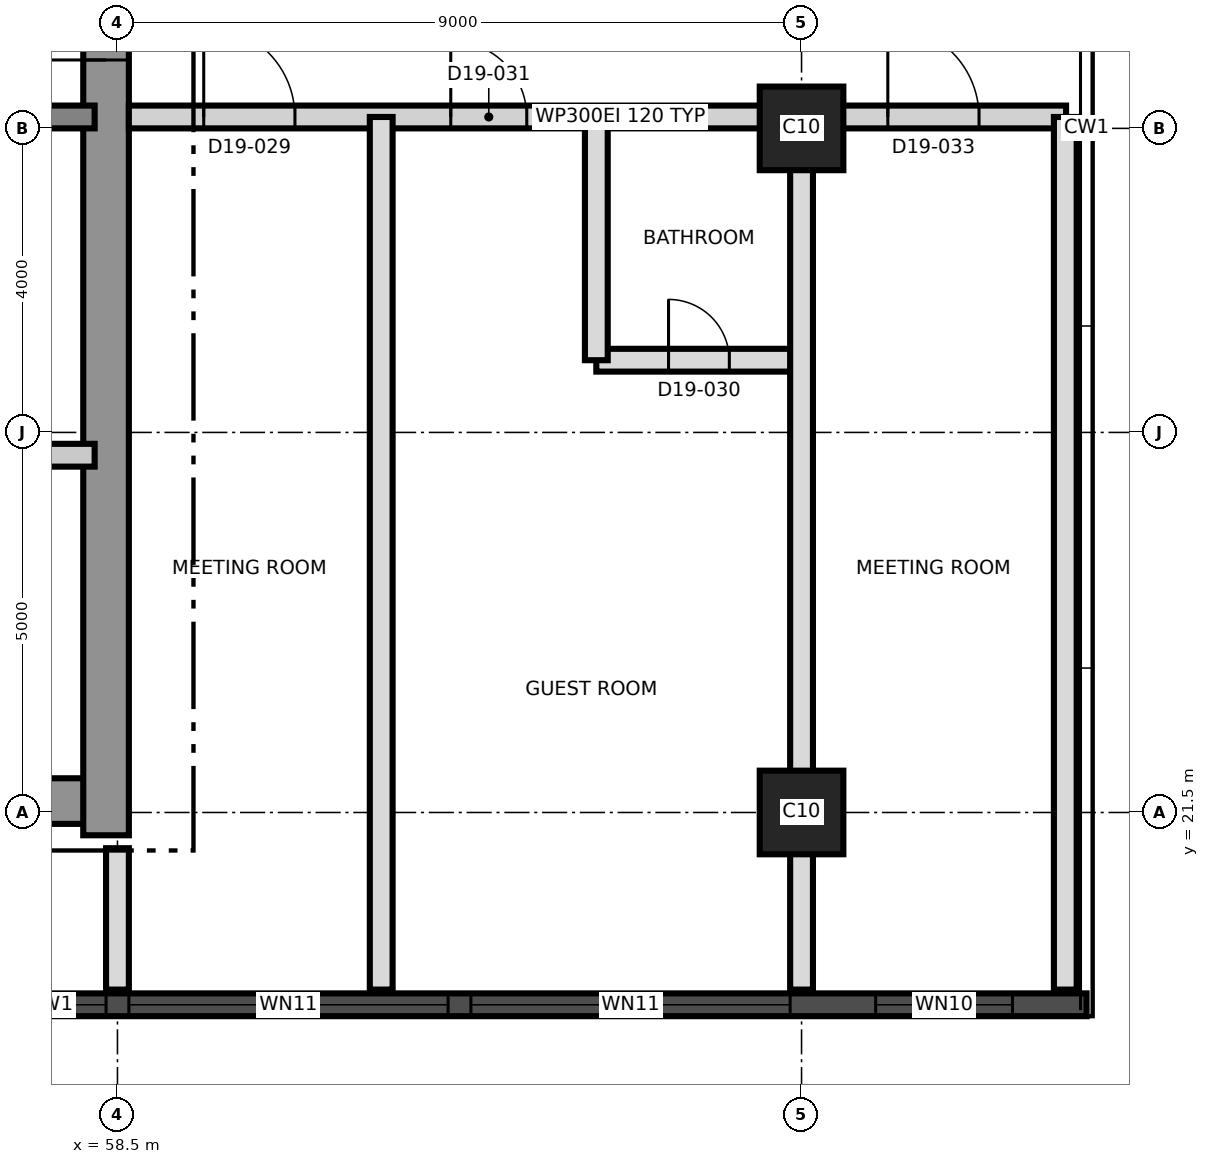
"""IFC4 building model, lengths in metres.
Left out: names, types, materials, properties, quantities, classifications, styles, units other than length and angle.
Written with IfcOpenShell. Run it as: python <this file> out.ifc"""

import sys

from ifc_helpers import new_model, si_unit, direction, frame, frame_2d, origin, origin_2d, place, context, subcontext, project, spatial, rectangle, extrude, element, fill, save


model = new_model("IFC4")
c1 = context("Model", 3, precision=1e-05, world=origin(), true_north=direction((0.0, 1.0)))
c2 = subcontext(c1, "Body", "Model", "MODEL_VIEW")
j1 = project(units=[si_unit("LENGTHUNIT", "METRE"), si_unit("PLANEANGLEUNIT", "RADIAN")], contexts=[c1])
p1 = place(None, origin())
s1 = spatial("IfcSite", under=j1, at=p1, CompositionType="ELEMENT")
p2 = place(p1, origin())
s2 = spatial("IfcBuilding", under=s1, at=p2, CompositionType="ELEMENT")
p3 = place(p2, frame((0.0, 0.0, 179.2)))
s3 = spatial("IfcBuildingStorey", under=s2, at=p3, CompositionType="ELEMENT", Elevation=179.2)
p4 = place(p3, frame((31.2, 21.65, 0.0), z_axis=(0.0, 0.0, 1.0), x_axis=(1.0, 0.0, 0.0)))
e1 = element("IfcWall", 1, at=p4, inside=s3, PredefinedType="SHEAR", context=c2, shape_type="SweptSolid", body=[
    extrude(rectangle(XDim=27.0, YDim=0.6, at=frame_2d((13.5, 0.0))), origin(), (0.0, 0.0, 1.0), 3.7),
])
p5 = place(p3, frame((58.35, 21.2, 0.0), z_axis=(0.0, 0.0, 1.0), x_axis=(0.0, 1.0, 0.0)))
e2 = element("IfcWall", 2, at=p5, inside=s3, PredefinedType="SHEAR", context=c2, shape_type="SweptSolid", body=[
    extrude(rectangle(XDim=18.6, YDim=0.6, at=frame_2d((9.3, 0.0))), origin(), (0.0, 0.0, 1.0), 3.7),
])
p6 = place(p5, frame((10.2, 0.0, 0.0)))
e3 = element("IfcOpeningElement", 3, at=p6, cuts=e2, PredefinedType="OPENING", context=c2, shape_type="SweptSolid", body=[
    extrude(rectangle(XDim=1.2, YDim=2.1, at=frame_2d((0.6, 1.05))), frame((0.0, 0.31, 0.0), z_axis=(0.0, -1.0, 0.0), x_axis=(1.0, 0.0, 0.0)), (0.0, 0.0, 1.0), 0.62),
])
p7 = place(p3, frame((31.8, 30.65, 0.0), z_axis=(0.0, 0.0, 1.0), x_axis=(1.0, 0.0, 0.0)))
e4 = element("IfcWall", 4, at=p7, inside=s3, PredefinedType="SHEAR", context=c2, shape_type="SweptSolid", body=[
    extrude(rectangle(XDim=26.4, YDim=0.3, at=frame_2d((13.2, 0.0))), origin(), (0.0, 0.0, 1.0), 3.7),
])
p8 = place(p7, frame((24.7, 0.0, 0.0)))
e5 = element("IfcOpeningElement", 5, at=p8, cuts=e4, PredefinedType="OPENING", context=c2, shape_type="SweptSolid", body=[
    extrude(rectangle(XDim=1.0, YDim=2.1, at=frame_2d((0.5, 1.05))), frame((0.0, 0.16, 0.0), z_axis=(0.0, -1.0, 0.0), x_axis=(1.0, 0.0, 0.0)), (0.0, 0.0, 1.0), 0.32),
])
p9 = place(p7, frame((4.0, 0.0, 0.0)))
e6 = element("IfcOpeningElement", 6, at=p9, cuts=e4, PredefinedType="OPENING", context=c2, shape_type="SweptSolid", body=[
    extrude(rectangle(XDim=1.0, YDim=2.1, at=frame_2d((0.5, 1.05))), frame((0.0, 0.16, 0.0), z_axis=(0.0, -1.0, 0.0), x_axis=(1.0, 0.0, 0.0)), (0.0, 0.0, 1.0), 0.32),
])
for number, where, z_axis, x_axis in (
    (7, (67.5, 21.5, 0.0), (0.0, 0.0, 1.0), (1.0, 0.0, 0.0)),
    (8, (67.5, 30.5, 0.0), (0.0, 0.0, 1.0), (1.0, 0.0, 0.0)),
):
    element("IfcColumn", number, at=place(p3, frame(where, z_axis=z_axis, x_axis=x_axis)), inside=s3, PredefinedType="COLUMN", context=c2, shape_type="SweptSolid", body=[
        extrude(rectangle(XDim=1.1, YDim=1.1, at=origin_2d()), origin(), (0.0, 0.0, 1.0), 3.7),
    ])
p10 = place(p3, frame((44.01, 18.97, 0.0), z_axis=(0.0, 0.0, 1.0), x_axis=(1.0, 0.0, 0.0)))
e9 = element("IfcWall", 9, at=p10, inside=s3, PredefinedType="SOLIDWALL", context=c2, shape_type="SweptSolid", body=[
    extrude(rectangle(XDim=27.24, YDim=0.3, at=frame_2d((13.62, 0.0))), origin(), (0.0, 0.0, 1.0), 3.4),
])
p11 = place(p10, frame((1.845, 0.0, 0.3)))
e10 = element("IfcOpeningElement", 10, at=p11, cuts=e9, PredefinedType="OPENING", context=c2, shape_type="SweptSolid", body=[
    extrude(rectangle(XDim=1.8, YDim=2.4, at=frame_2d((0.9, 1.2))), frame((0.0, 0.16, 0.0), z_axis=(0.0, -1.0, 0.0), x_axis=(1.0, 0.0, 0.0)), (0.0, 0.0, 1.0), 0.32),
])
p12 = place(p10, frame((5.64, 0.0, 0.9)))
e11 = element("IfcOpeningElement", 11, at=p12, cuts=e9, PredefinedType="OPENING", context=c2, shape_type="SweptSolid", body=[
    extrude(rectangle(XDim=4.2, YDim=1.5, at=frame_2d((2.1, 0.75))), frame((0.0, 0.16, 0.0), z_axis=(0.0, -1.0, 0.0), x_axis=(1.0, 0.0, 0.0)), (0.0, 0.0, 1.0), 0.32),
])
p13 = place(p10, frame((10.14, 0.0, 0.9)))
e12 = element("IfcOpeningElement", 12, at=p13, cuts=e9, PredefinedType="OPENING", context=c2, shape_type="SweptSolid", body=[
    extrude(rectangle(XDim=4.2, YDim=1.5, at=frame_2d((2.1, 0.75))), frame((0.0, 0.16, 0.0), z_axis=(0.0, -1.0, 0.0), x_axis=(1.0, 0.0, 0.0)), (0.0, 0.0, 1.0), 0.32),
])
p14 = place(p10, frame((14.64, 0.0, 0.9)))
e13 = element("IfcOpeningElement", 13, at=p14, cuts=e9, PredefinedType="OPENING", context=c2, shape_type="SweptSolid", body=[
    extrude(rectangle(XDim=4.2, YDim=1.5, at=frame_2d((2.1, 0.75))), frame((0.0, 0.16, 0.0), z_axis=(0.0, -1.0, 0.0), x_axis=(1.0, 0.0, 0.0)), (0.0, 0.0, 1.0), 0.32),
])
p15 = place(p10, frame((19.14, 0.0, 0.9)))
e14 = element("IfcOpeningElement", 14, at=p15, cuts=e9, PredefinedType="OPENING", context=c2, shape_type="SweptSolid", body=[
    extrude(rectangle(XDim=4.2, YDim=1.5, at=frame_2d((2.1, 0.75))), frame((0.0, 0.16, 0.0), z_axis=(0.0, -1.0, 0.0), x_axis=(1.0, 0.0, 0.0)), (0.0, 0.0, 1.0), 0.32),
])
p16 = place(p10, frame((24.465, 0.0, 0.3)))
e15 = element("IfcOpeningElement", 15, at=p16, cuts=e9, PredefinedType="OPENING", context=c2, shape_type="SweptSolid", body=[
    extrude(rectangle(XDim=1.8, YDim=2.4, at=frame_2d((0.9, 1.2))), frame((0.0, 0.16, 0.0), z_axis=(0.0, -1.0, 0.0), x_axis=(1.0, 0.0, 0.0)), (0.0, 0.0, 1.0), 0.32),
])
p17 = place(p3, frame((55.8, 26.2, 0.0), z_axis=(0.0, 0.0, 1.0), x_axis=(1.0, 0.0, 0.0)))
e16 = element("IfcWall", 16, at=p17, inside=s3, PredefinedType="PARTITIONING", context=c2, shape_type="SweptSolid", body=[
    extrude(rectangle(XDim=2.4, YDim=0.3, at=frame_2d((1.2, 0.0))), origin(), (0.0, 0.0, 1.0), 3.4),
])
p18 = place(p17, frame((0.75, 0.0, 0.0)))
e17 = element("IfcOpeningElement", 17, at=p18, cuts=e16, PredefinedType="OPENING", context=c2, shape_type="SweptSolid", body=[
    extrude(rectangle(XDim=0.9, YDim=2.1, at=frame_2d((0.45, 1.05))), frame((0.0, 0.16, 0.0), z_axis=(0.0, -1.0, 0.0), x_axis=(1.0, 0.0, 0.0)), (0.0, 0.0, 1.0), 0.32),
])
p19 = place(p3, frame((64.8, 27.45, 0.0), z_axis=(0.0, 0.0, 1.0), x_axis=(1.0, 0.0, 0.0)))
e18 = element("IfcWall", 18, at=p19, inside=s3, PredefinedType="PARTITIONING", context=c2, shape_type="SweptSolid", body=[
    extrude(rectangle(XDim=2.7, YDim=0.3, at=frame_2d((1.35, 0.0))), origin(), (0.0, 0.0, 1.0), 3.4),
])
p20 = place(p19, frame((0.95, 0.0, 0.0)))
e19 = element("IfcOpeningElement", 19, at=p20, cuts=e18, PredefinedType="OPENING", context=c2, shape_type="SweptSolid", body=[
    extrude(rectangle(XDim=0.8, YDim=2.1, at=frame_2d((0.4, 1.05))), frame((0.0, 0.16, 0.0), z_axis=(0.0, -1.0, 0.0), x_axis=(1.0, 0.0, 0.0)), (0.0, 0.0, 1.0), 0.32),
])
p21 = place(p3, frame((58.65, 30.65, 0.0), z_axis=(0.0, 0.0, 1.0), x_axis=(1.0, 0.0, 0.0)))
e20 = element("IfcWall", 20, at=p21, inside=s3, PredefinedType="PARTITIONING", context=c2, shape_type="SweptSolid", body=[
    extrude(rectangle(XDim=12.33, YDim=0.3, at=frame_2d((6.165, 0.0))), origin(), (0.0, 0.0, 1.0), 3.4),
])
p22 = place(p21, frame((0.985, 0.0, 0.0)))
e21 = element("IfcOpeningElement", 21, at=p22, cuts=e20, PredefinedType="OPENING", context=c2, shape_type="SweptSolid", body=[
    extrude(rectangle(XDim=1.2, YDim=2.1, at=frame_2d((0.6, 1.05))), frame((0.0, 0.16, 0.0), z_axis=(0.0, -1.0, 0.0), x_axis=(1.0, 0.0, 0.0)), (0.0, 0.0, 1.0), 0.32),
])
p23 = place(p21, frame((4.235, 0.0, 0.0)))
e22 = element("IfcOpeningElement", 22, at=p23, cuts=e20, PredefinedType="OPENING", context=c2, shape_type="SweptSolid", body=[
    extrude(rectangle(XDim=1.0, YDim=2.1, at=frame_2d((0.5, 1.05))), frame((0.0, 0.16, 0.0), z_axis=(0.0, -1.0, 0.0), x_axis=(1.0, 0.0, 0.0)), (0.0, 0.0, 1.0), 0.32),
])
p24 = place(p21, frame((9.985, 0.0, 0.0)))
e23 = element("IfcOpeningElement", 23, at=p24, cuts=e20, PredefinedType="OPENING", context=c2, shape_type="SweptSolid", body=[
    extrude(rectangle(XDim=1.2, YDim=2.1, at=frame_2d((0.6, 1.05))), frame((0.0, 0.16, 0.0), z_axis=(0.0, -1.0, 0.0), x_axis=(1.0, 0.0, 0.0)), (0.0, 0.0, 1.0), 0.32),
])
p25 = place(p3, frame((58.5, 19.17, 0.0), z_axis=(0.0, 0.0, 1.0), x_axis=(0.0, 1.0, 0.0)))
e24 = element("IfcWall", 24, at=p25, inside=s3, PredefinedType="PARTITIONING", context=c2, shape_type="SweptSolid", body=[
    extrude(rectangle(XDim=1.86, YDim=0.3, at=frame_2d((0.93, 0.0))), origin(), (0.0, 0.0, 1.0), 3.4),
])
p26 = place(p3, frame((61.97, 19.17, 0.0), z_axis=(0.0, 0.0, 1.0), x_axis=(0.0, 1.0, 0.0)))
e25 = element("IfcWall", 25, at=p26, inside=s3, PredefinedType="PARTITIONING", context=c2, shape_type="SweptSolid", body=[
    extrude(rectangle(XDim=11.48, YDim=0.3, at=frame_2d((5.74, 0.0))), origin(), (0.0, 0.0, 1.0), 3.4),
])
p27 = place(p3, frame((64.8, 27.45, 0.0), z_axis=(0.0, 0.0, 1.0), x_axis=(0.0, 1.0, 0.0)))
e26 = element("IfcWall", 26, at=p27, inside=s3, PredefinedType="PARTITIONING", context=c2, shape_type="SweptSolid", body=[
    extrude(rectangle(XDim=3.2, YDim=0.3, at=frame_2d((1.6, 0.0))), origin(), (0.0, 0.0, 1.0), 3.4),
])
for number, where, z_axis, x_axis in (
    (27, (67.5, 19.17, 0.0), (0.0, 0.0, 1.0), (0.0, 1.0, 0.0)),
    (28, (70.97, 19.17, 0.0), (0.0, 0.0, 1.0), (0.0, 1.0, 0.0)),
):
    element("IfcWall", number, at=place(p3, frame(where, z_axis=z_axis, x_axis=x_axis)), inside=s3, PredefinedType="PARTITIONING", context=c2, shape_type="SweptSolid", body=[
        extrude(rectangle(XDim=11.48, YDim=0.3, at=frame_2d((5.74, 0.0))), origin(), (0.0, 0.0, 1.0), 3.4),
    ])
p28 = place(p13, origin())
e29 = element("IfcWindow", 29, at=p28, inside=s3, PartitioningType="SINGLE_PANEL", PredefinedType="WINDOW", context=c2, shape_type="SweptSolid", body=[
    extrude(rectangle(XDim=4.2, YDim=1.5, at=frame_2d((2.1, 0.75))), frame((0.0, 0.03, 0.0), z_axis=(0.0, -1.0, 0.0), x_axis=(1.0, 0.0, 0.0)), (0.0, 0.0, 1.0), 0.06),
])
fill(e12, e29)
p29 = place(p14, origin())
e30 = element("IfcWindow", 30, at=p29, inside=s3, PartitioningType="SINGLE_PANEL", PredefinedType="WINDOW", context=c2, shape_type="SweptSolid", body=[
    extrude(rectangle(XDim=4.2, YDim=1.5, at=frame_2d((2.1, 0.75))), frame((0.0, 0.03, 0.0), z_axis=(0.0, -1.0, 0.0), x_axis=(1.0, 0.0, 0.0)), (0.0, 0.0, 1.0), 0.06),
])
fill(e13, e30)
p30 = place(p15, origin())
e31 = element("IfcWindow", 31, at=p30, inside=s3, PartitioningType="SINGLE_PANEL", PredefinedType="WINDOW", context=c2, shape_type="SweptSolid", body=[
    extrude(rectangle(XDim=4.2, YDim=1.5, at=frame_2d((2.1, 0.75))), frame((0.0, 0.03, 0.0), z_axis=(0.0, -1.0, 0.0), x_axis=(1.0, 0.0, 0.0)), (0.0, 0.0, 1.0), 0.06),
])
fill(e14, e31)
p31 = place(p16, origin())
e32 = element("IfcWindow", 32, at=p31, inside=s3, PartitioningType="SINGLE_PANEL", PredefinedType="WINDOW", context=c2, shape_type="SweptSolid", body=[
    extrude(rectangle(XDim=1.8, YDim=2.4, at=frame_2d((0.9, 1.2))), frame((0.0, 0.03, 0.0), z_axis=(0.0, -1.0, 0.0), x_axis=(1.0, 0.0, 0.0)), (0.0, 0.0, 1.0), 0.06),
])
fill(e15, e32)
p32 = place(p6, origin())
e33 = element("IfcDoor", 33, at=p32, inside=s3, OperationType="SINGLE_SWING_LEFT", PredefinedType="DOOR", context=c2, shape_type="SweptSolid", body=[
    extrude(rectangle(XDim=1.2, YDim=2.1, at=frame_2d((0.6, 1.05))), frame((0.0, 0.025, 0.0), z_axis=(0.0, -1.0, 0.0), x_axis=(1.0, 0.0, 0.0)), (0.0, 0.0, 1.0), 0.05),
])
fill(e3, e33)
p33 = place(p22, origin())
e34 = element("IfcDoor", 34, at=p33, inside=s3, OperationType="SINGLE_SWING_LEFT", PredefinedType="DOOR", context=c2, shape_type="SweptSolid", body=[
    extrude(rectangle(XDim=1.2, YDim=2.1, at=frame_2d((0.6, 1.05))), frame((0.0, 0.025, 0.0), z_axis=(0.0, -1.0, 0.0), x_axis=(1.0, 0.0, 0.0)), (0.0, 0.0, 1.0), 0.05),
])
fill(e21, e34)
p34 = place(p20, origin())
e35 = element("IfcDoor", 35, at=p34, inside=s3, OperationType="SINGLE_SWING_RIGHT", PredefinedType="DOOR", context=c2, shape_type="SweptSolid", body=[
    extrude(rectangle(XDim=0.8, YDim=2.1, at=frame_2d((0.4, 1.05))), frame((0.0, 0.025, 0.0), z_axis=(0.0, -1.0, 0.0), x_axis=(1.0, 0.0, 0.0)), (0.0, 0.0, 1.0), 0.05),
])
fill(e19, e35)
p35 = place(p23, origin())
e36 = element("IfcDoor", 36, at=p35, inside=s3, OperationType="SINGLE_SWING_LEFT", PredefinedType="DOOR", context=c2, shape_type="SweptSolid", body=[
    extrude(rectangle(XDim=1.0, YDim=2.1, at=frame_2d((0.5, 1.05))), frame((0.0, 0.025, 0.0), z_axis=(0.0, -1.0, 0.0), x_axis=(1.0, 0.0, 0.0)), (0.0, 0.0, 1.0), 0.05),
])
fill(e22, e36)
p36 = place(p24, origin())
e37 = element("IfcDoor", 37, at=p36, inside=s3, OperationType="SINGLE_SWING_RIGHT", PredefinedType="DOOR", context=c2, shape_type="SweptSolid", body=[
    extrude(rectangle(XDim=1.2, YDim=2.1, at=frame_2d((0.6, 1.05))), frame((0.0, 0.025, 0.0), z_axis=(0.0, -1.0, 0.0), x_axis=(1.0, 0.0, 0.0)), (0.0, 0.0, 1.0), 0.05),
])
fill(e23, e37)
save(model, sys.argv[1])
